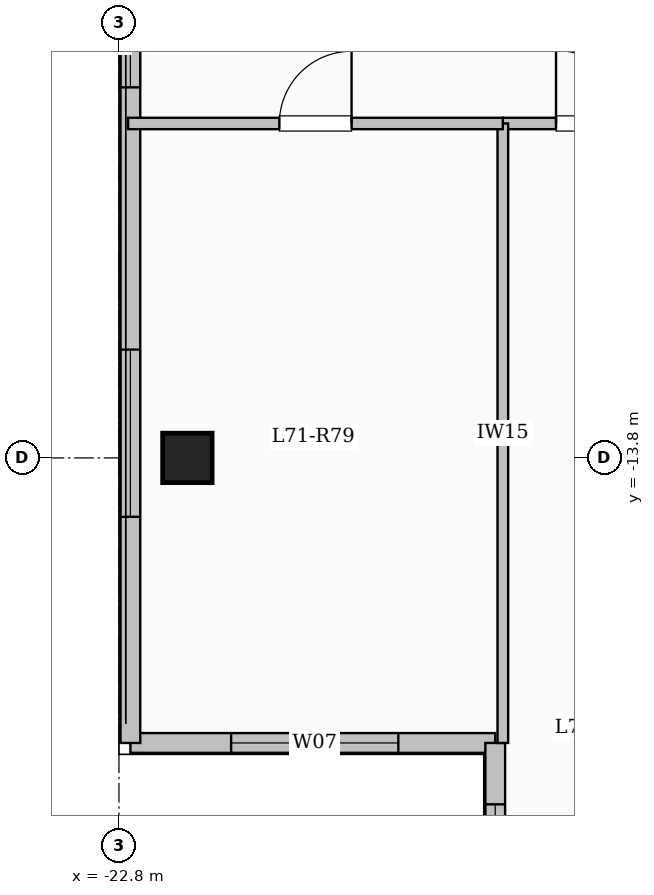
"""IFC4 building model, lengths in metres.
Left out: names, types, materials, properties, quantities, classifications, styles, units other than length and angle.
Written with IfcOpenShell. Run it as: python <this file> out.ifc"""

import sys

from ifc_helpers import new_model, si_unit, direction, frame, frame_2d, origin, origin_2d, place, context, subcontext, project, spatial, rectangle, extrude, element, fill, save


model = new_model("IFC4")
c1 = context("Model", 3, precision=1e-05, world=origin(), true_north=direction((0.0, 1.0)))
c2 = subcontext(c1, "Body", "Model", "MODEL_VIEW")
j1 = project(units=[si_unit("LENGTHUNIT", "METRE"), si_unit("PLANEANGLEUNIT", "RADIAN")], contexts=[c1])
p1 = place(None, origin())
s1 = spatial("IfcSite", under=j1, at=p1, CompositionType="ELEMENT")
p2 = place(p1, origin())
s2 = spatial("IfcBuilding", under=s1, at=p2, CompositionType="ELEMENT")
p3 = place(p2, frame((0.0, 0.0, 261.6)))
s3 = spatial("IfcBuildingStorey", under=s2, at=p3, CompositionType="ELEMENT", Elevation=261.6)
p4 = place(p3, frame((-21.9, -13.8, 0.0), z_axis=(0.0, 0.0, 1.0), x_axis=(1.0, 0.0, 0.0)))
e1 = element("IfcColumn", 1, at=p4, inside=s3, PredefinedType="COLUMN", context=c2, shape_type="SweptSolid", body=[
    extrude(rectangle(XDim=0.65, YDim=0.65, at=origin_2d()), origin(), (0.0, 0.0, 1.0), 3.35),
])
p5 = place(p3, frame((-17.85, -17.55, 0.0), z_axis=(0.0, 0.0, 1.0), x_axis=(-1.0, 0.0, 0.0)))
e2 = element("IfcWall", 2, at=p5, inside=s3, PredefinedType="SOLIDWALL", context=c2, shape_type="SweptSolid", body=[
    extrude(rectangle(XDim=4.8, YDim=0.26, at=frame_2d((2.4, 0.0))), origin(), (0.0, 0.0, 1.0), 3.1),
])
p6 = place(p5, frame((1.275, 0.0, 0.9)))
e3 = element("IfcOpeningElement", 3, at=p6, cuts=e2, PredefinedType="OPENING", context=c2, shape_type="SweptSolid", body=[
    extrude(rectangle(XDim=2.2, YDim=1.75, at=frame_2d((1.1, 0.875))), frame((0.0, 0.14, 0.0), z_axis=(0.0, -1.0, 0.0), x_axis=(1.0, 0.0, 0.0)), (0.0, 0.0, 1.0), 0.28),
])
p7 = place(p3, frame((-22.65, -17.55, 0.0), z_axis=(0.0, 0.0, 1.0), x_axis=(0.0, 1.0, 0.0)))
e4 = element("IfcWall", 4, at=p7, inside=s3, PredefinedType="SOLIDWALL", context=c2, shape_type="SweptSolid", body=[
    extrude(rectangle(XDim=35.1, YDim=0.26, at=frame_2d((17.55, 0.0))), origin(), (0.0, 0.0, 1.0), 3.1),
])
p8 = place(p7, frame((2.975, 0.0, 0.9)))
e5 = element("IfcOpeningElement", 5, at=p8, cuts=e4, PredefinedType="OPENING", context=c2, shape_type="SweptSolid", body=[
    extrude(rectangle(XDim=2.2, YDim=1.75, at=frame_2d((1.1, 0.875))), frame((0.0, 0.14, 0.0), z_axis=(0.0, -1.0, 0.0), x_axis=(1.0, 0.0, 0.0)), (0.0, 0.0, 1.0), 0.28),
])
p9 = place(p7, frame((8.625, 0.0, 0.95)))
e6 = element("IfcOpeningElement", 6, at=p9, cuts=e4, PredefinedType="OPENING", context=c2, shape_type="SweptSolid", body=[
    extrude(rectangle(XDim=1.2, YDim=1.5, at=frame_2d((0.6, 0.75))), frame((0.0, 0.14, 0.0), z_axis=(0.0, -1.0, 0.0), x_axis=(1.0, 0.0, 0.0)), (0.0, 0.0, 1.0), 0.28),
])
p10 = place(p7, frame((18.3, 0.0, 0.9)))
e7 = element("IfcOpeningElement", 7, at=p10, cuts=e4, PredefinedType="OPENING", context=c2, shape_type="SweptSolid", body=[
    extrude(rectangle(XDim=2.0, YDim=1.7, at=frame_2d((1.0, 0.85))), frame((0.0, 0.14, 0.0), z_axis=(0.0, -1.0, 0.0), x_axis=(1.0, 0.0, 0.0)), (0.0, 0.0, 1.0), 0.28),
])
p11 = place(p7, frame((28.675, 0.0, 0.95)))
e8 = element("IfcOpeningElement", 8, at=p11, cuts=e4, PredefinedType="OPENING", context=c2, shape_type="SweptSolid", body=[
    extrude(rectangle(XDim=1.0, YDim=1.5, at=frame_2d((0.5, 0.75))), frame((0.0, 0.14, 0.0), z_axis=(0.0, -1.0, 0.0), x_axis=(1.0, 0.0, 0.0)), (0.0, 0.0, 1.0), 0.28),
])
p12 = place(p7, frame((31.6, 0.0, 0.9)))
e9 = element("IfcOpeningElement", 9, at=p12, cuts=e4, PredefinedType="OPENING", context=c2, shape_type="SweptSolid", body=[
    extrude(rectangle(XDim=2.0, YDim=1.7, at=frame_2d((1.0, 0.85))), frame((0.0, 0.14, 0.0), z_axis=(0.0, -1.0, 0.0), x_axis=(1.0, 0.0, 0.0)), (0.0, 0.0, 1.0), 0.28),
])
p13 = place(p3, frame((-17.85, -20.85, 0.0), z_axis=(0.0, 0.0, 1.0), x_axis=(0.0, 1.0, 0.0)))
e10 = element("IfcWall", 10, at=p13, inside=s3, PredefinedType="SOLIDWALL", context=c2, shape_type="SweptSolid", body=[
    extrude(rectangle(XDim=3.3, YDim=0.26, at=frame_2d((1.65, 0.0))), origin(), (0.0, 0.0, 1.0), 3.1),
])
p14 = place(p13, frame((0.843, 0.0, 0.9)))
e11 = element("IfcOpeningElement", 11, at=p14, cuts=e10, PredefinedType="OPENING", context=c2, shape_type="SweptSolid", body=[
    extrude(rectangle(XDim=1.65, YDim=1.6, at=frame_2d((0.825, 0.8))), frame((0.0, 0.14, 0.0), z_axis=(0.0, -1.0, 0.0), x_axis=(1.0, 0.0, 0.0)), (0.0, 0.0, 1.0), 0.28),
])
p15 = place(p3, frame((-17.75, -9.4, 0.0), z_axis=(0.0, 0.0, 1.0), x_axis=(1.0, 0.0, 0.0)))
e12 = element("IfcWall", 12, at=p15, inside=s3, PredefinedType="PARTITIONING", context=c2, shape_type="SweptSolid", body=[
    extrude(rectangle(XDim=9.2, YDim=0.15, at=frame_2d((4.6, 0.0))), origin(), (0.0, 0.0, 1.0), 3.1),
])
p16 = place(p15, frame((0.7, 0.0, 0.0)))
e13 = element("IfcOpeningElement", 13, at=p16, cuts=e12, PredefinedType="OPENING", context=c2, shape_type="SweptSolid", body=[
    extrude(rectangle(XDim=0.96, YDim=2.15, at=frame_2d((0.48, 1.075))), frame((0.0, 0.085, 0.0), z_axis=(0.0, -1.0, 0.0), x_axis=(1.0, 0.0, 0.0)), (0.0, 0.0, 1.0), 0.17),
])
p17 = place(p15, frame((5.275, 0.0, 0.0)))
e14 = element("IfcOpeningElement", 14, at=p17, cuts=e12, PredefinedType="OPENING", context=c2, shape_type="SweptSolid", body=[
    extrude(rectangle(XDim=0.96, YDim=2.15, at=frame_2d((0.48, 1.075))), frame((0.0, 0.085, 0.0), z_axis=(0.0, -1.0, 0.0), x_axis=(1.0, 0.0, 0.0)), (0.0, 0.0, 1.0), 0.17),
])
p18 = place(p3, frame((-17.75, -17.55, 0.0), z_axis=(0.0, 0.0, 1.0), x_axis=(0.0, 1.0, 0.0)))
e15 = element("IfcWall", 15, at=p18, inside=s3, PredefinedType="PARTITIONING", context=c2, shape_type="SweptSolid", body=[
    extrude(rectangle(XDim=8.15, YDim=0.14, at=frame_2d((4.075, 0.0))), origin(), (0.0, 0.0, 1.0), 3.1),
])
p19 = place(p3, frame((-22.68, -9.4, 0.0), z_axis=(0.0, 0.0, 1.0), x_axis=(1.0, 0.0, 0.0)))
e16 = element("IfcWall", 16, at=p19, inside=s3, PredefinedType="PARTITIONING", context=c2, shape_type="SweptSolid", body=[
    extrude(rectangle(XDim=4.93, YDim=0.15, at=frame_2d((2.465, 0.0))), origin(), (0.0, 0.0, 1.0), 3.1),
])
p20 = place(p19, frame((1.99, 0.0, 0.0)))
e17 = element("IfcOpeningElement", 17, at=p20, cuts=e16, PredefinedType="OPENING", context=c2, shape_type="SweptSolid", body=[
    extrude(rectangle(XDim=0.95, YDim=2.15, at=frame_2d((0.475, 1.075))), frame((0.0, 0.085, 0.0), z_axis=(0.0, -1.0, 0.0), x_axis=(1.0, 0.0, 0.0)), (0.0, 0.0, 1.0), 0.17),
])
p21 = place(p6, origin())
e18 = element("IfcWindow", 18, at=p21, inside=s3, PartitioningType="SINGLE_PANEL", PredefinedType="WINDOW", context=c2, shape_type="SweptSolid", body=[
    extrude(rectangle(XDim=2.2, YDim=1.75, at=frame_2d((1.1, 0.875))), frame((0.0, 0.03, 0.0), z_axis=(0.0, -1.0, 0.0), x_axis=(1.0, 0.0, 0.0)), (0.0, 0.0, 1.0), 0.06),
])
fill(e3, e18)
p22 = place(p8, origin())
e19 = element("IfcWindow", 19, at=p22, inside=s3, PartitioningType="SINGLE_PANEL", PredefinedType="WINDOW", context=c2, shape_type="SweptSolid", body=[
    extrude(rectangle(XDim=2.2, YDim=1.75, at=frame_2d((1.1, 0.875))), frame((0.0, 0.03, 0.0), z_axis=(0.0, -1.0, 0.0), x_axis=(1.0, 0.0, 0.0)), (0.0, 0.0, 1.0), 0.06),
])
fill(e5, e19)
p23 = place(p9, origin())
e20 = element("IfcWindow", 20, at=p23, inside=s3, PartitioningType="SINGLE_PANEL", PredefinedType="WINDOW", context=c2, shape_type="SweptSolid", body=[
    extrude(rectangle(XDim=1.2, YDim=1.5, at=frame_2d((0.6, 0.75))), frame((0.0, 0.03, 0.0), z_axis=(0.0, -1.0, 0.0), x_axis=(1.0, 0.0, 0.0)), (0.0, 0.0, 1.0), 0.06),
])
fill(e6, e20)
p24 = place(p14, origin())
e21 = element("IfcWindow", 21, at=p24, inside=s3, PartitioningType="SINGLE_PANEL", PredefinedType="WINDOW", context=c2, shape_type="SweptSolid", body=[
    extrude(rectangle(XDim=1.65, YDim=1.6, at=frame_2d((0.825, 0.8))), frame((0.0, 0.03, 0.0), z_axis=(0.0, -1.0, 0.0), x_axis=(1.0, 0.0, 0.0)), (0.0, 0.0, 1.0), 0.06),
])
fill(e11, e21)
p25 = place(p16, origin())
e22 = element("IfcDoor", 22, at=p25, inside=s3, OperationType="SINGLE_SWING_LEFT", PredefinedType="DOOR", context=c2, shape_type="SweptSolid", body=[
    extrude(rectangle(XDim=0.96, YDim=2.15, at=frame_2d((0.48, 1.075))), frame((0.0, 0.025, 0.0), z_axis=(0.0, -1.0, 0.0), x_axis=(1.0, 0.0, 0.0)), (0.0, 0.0, 1.0), 0.05),
])
fill(e13, e22)
p26 = place(p20, origin())
e23 = element("IfcDoor", 23, at=p26, inside=s3, OperationType="SINGLE_SWING_RIGHT", PredefinedType="DOOR", context=c2, shape_type="SweptSolid", body=[
    extrude(rectangle(XDim=0.95, YDim=2.15, at=frame_2d((0.475, 1.075))), frame((0.0, 0.025, 0.0), z_axis=(0.0, -1.0, 0.0), x_axis=(1.0, 0.0, 0.0)), (0.0, 0.0, 1.0), 0.05),
])
fill(e17, e23)
save(model, sys.argv[1])
